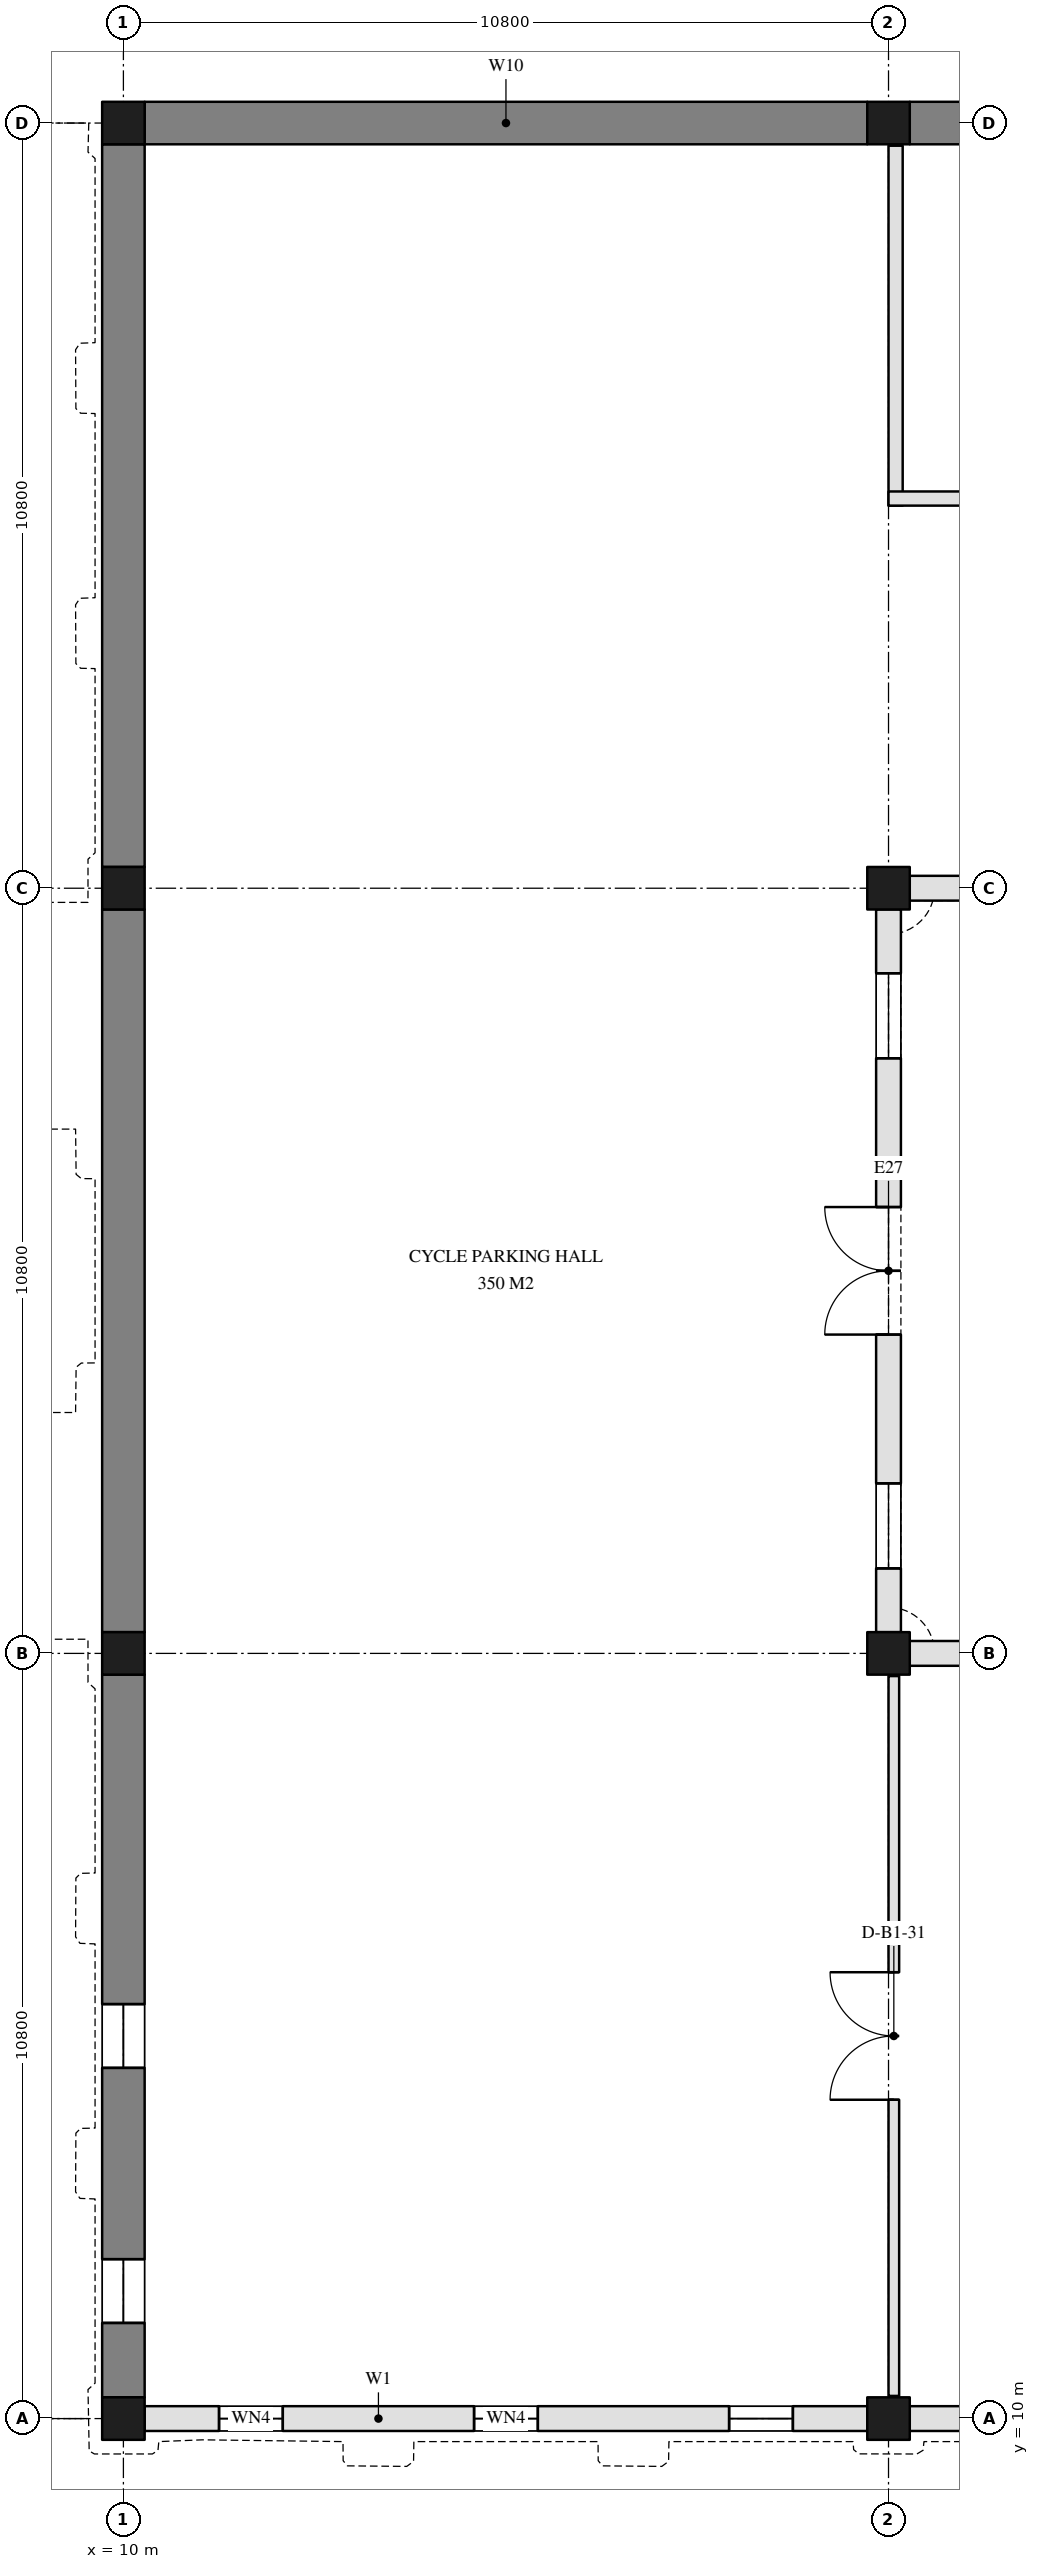
"""IFC4 building model, lengths in metres.
Left out: names, types, materials, properties, quantities, classifications, styles, units other than length and angle.
Written with IfcOpenShell. Run it as: python <this file> out.ifc"""

import sys

from ifc_helpers import new_model, si_unit, direction, frame, frame_2d, origin, origin_2d, place, context, subcontext, project, spatial, rectangle, extrude, element, fill, save


model = new_model("IFC4")
c1 = context("Model", 3, precision=1e-05, world=origin(), true_north=direction((0.0, 1.0)))
c2 = subcontext(c1, "Body", "Model", "MODEL_VIEW")
j1 = project(units=[si_unit("LENGTHUNIT", "METRE"), si_unit("PLANEANGLEUNIT", "RADIAN")], contexts=[c1])
p1 = place(None, origin())
s1 = spatial("IfcSite", under=j1, at=p1, CompositionType="ELEMENT")
p2 = place(p1, origin())
s2 = spatial("IfcBuilding", under=s1, at=p2, CompositionType="ELEMENT")
p3 = place(p2, frame((0.0, 0.0, -5.4)))
s3 = spatial("IfcBuildingStorey", under=s2, at=p3, CompositionType="ELEMENT", Elevation=-5.4)
for number, where, z_axis, x_axis in (
    (1, (10.0, 10.0, -0.4), (0.0, 0.0, 1.0), (1.0, 0.0, 0.0)),
    (2, (10.0, 20.8, -0.4), (0.0, 0.0, 1.0), (1.0, 0.0, 0.0)),
    (3, (10.0, 31.6, -0.4), (0.0, 0.0, 1.0), (1.0, 0.0, 0.0)),
    (4, (10.0, 42.4, -0.4), (0.0, 0.0, 1.0), (1.0, 0.0, 0.0)),
    (5, (20.8, 10.0, -0.4), (0.0, 0.0, 1.0), (1.0, 0.0, 0.0)),
    (6, (20.8, 20.8, -0.4), (0.0, 0.0, 1.0), (1.0, 0.0, 0.0)),
    (7, (20.8, 31.6, -0.4), (0.0, 0.0, 1.0), (1.0, 0.0, 0.0)),
    (8, (20.8, 42.4, -0.4), (0.0, 0.0, 1.0), (1.0, 0.0, 0.0)),
):
    element("IfcColumn", number, at=place(p3, frame(where, z_axis=z_axis, x_axis=x_axis)), inside=s3, PredefinedType="COLUMN", context=c2, shape_type="SweptSolid", body=[
        extrude(rectangle(XDim=0.6, YDim=0.6, at=origin_2d()), origin(), (0.0, 0.0, 1.0), 5.8),
    ])
p4 = place(p3, frame((10.3, 10.0, 0.0), z_axis=(0.0, 0.0, 1.0), x_axis=(1.0, 0.0, 0.0)))
e9 = element("IfcWall", 9, at=p4, inside=s3, PredefinedType="SOLIDWALL", context=c2, shape_type="SweptSolid", body=[
    extrude(rectangle(XDim=10.2, YDim=0.35, at=frame_2d((5.1, 0.0))), origin(), (0.0, 0.0, 1.0), 3.9),
])
p5 = place(p4, frame((1.05, 0.0, 1.5)))
e10 = element("IfcOpeningElement", 10, at=p5, cuts=e9, PredefinedType="OPENING", context=c2, shape_type="SweptSolid", body=[
    extrude(rectangle(XDim=0.9, YDim=1.2, at=frame_2d((0.45, 0.6))), frame((0.0, 0.185, 0.0), z_axis=(0.0, -1.0, 0.0), x_axis=(1.0, 0.0, 0.0)), (0.0, 0.0, 1.0), 0.37),
])
p6 = place(p4, frame((4.65, 0.0, 1.5)))
e11 = element("IfcOpeningElement", 11, at=p6, cuts=e9, PredefinedType="OPENING", context=c2, shape_type="SweptSolid", body=[
    extrude(rectangle(XDim=0.9, YDim=1.2, at=frame_2d((0.45, 0.6))), frame((0.0, 0.185, 0.0), z_axis=(0.0, -1.0, 0.0), x_axis=(1.0, 0.0, 0.0)), (0.0, 0.0, 1.0), 0.37),
])
p7 = place(p4, frame((8.25, 0.0, 1.5)))
e12 = element("IfcOpeningElement", 12, at=p7, cuts=e9, PredefinedType="OPENING", context=c2, shape_type="SweptSolid", body=[
    extrude(rectangle(XDim=0.9, YDim=1.2, at=frame_2d((0.45, 0.6))), frame((0.0, 0.185, 0.0), z_axis=(0.0, -1.0, 0.0), x_axis=(1.0, 0.0, 0.0)), (0.0, 0.0, 1.0), 0.37),
])
p8 = place(p3, frame((21.1, 10.0, 0.0), z_axis=(0.0, 0.0, 1.0), x_axis=(1.0, 0.0, 0.0)))
e13 = element("IfcWall", 13, at=p8, inside=s3, PredefinedType="SOLIDWALL", context=c2, shape_type="SweptSolid", body=[
    extrude(rectangle(XDim=10.2, YDim=0.35, at=frame_2d((5.1, 0.0))), origin(), (0.0, 0.0, 1.0), 3.9),
])
p9 = place(p8, frame((1.05, 0.0, 1.5)))
e14 = element("IfcOpeningElement", 14, at=p9, cuts=e13, PredefinedType="OPENING", context=c2, shape_type="SweptSolid", body=[
    extrude(rectangle(XDim=0.9, YDim=1.2, at=frame_2d((0.45, 0.6))), frame((0.0, 0.185, 0.0), z_axis=(0.0, -1.0, 0.0), x_axis=(1.0, 0.0, 0.0)), (0.0, 0.0, 1.0), 0.37),
])
p10 = place(p8, frame((3.75, 0.0, 0.0)))
e15 = element("IfcOpeningElement", 15, at=p10, cuts=e13, PredefinedType="OPENING", context=c2, shape_type="SweptSolid", body=[
    extrude(rectangle(XDim=2.7, YDim=2.4, at=frame_2d((1.35, 1.2))), frame((0.0, 0.185, 0.0), z_axis=(0.0, -1.0, 0.0), x_axis=(1.0, 0.0, 0.0)), (0.0, 0.0, 1.0), 0.37),
])
p11 = place(p8, frame((8.25, 0.0, 1.5)))
e16 = element("IfcOpeningElement", 16, at=p11, cuts=e13, PredefinedType="OPENING", context=c2, shape_type="SweptSolid", body=[
    extrude(rectangle(XDim=0.9, YDim=1.2, at=frame_2d((0.45, 0.6))), frame((0.0, 0.185, 0.0), z_axis=(0.0, -1.0, 0.0), x_axis=(1.0, 0.0, 0.0)), (0.0, 0.0, 1.0), 0.37),
])
p12 = place(p3, frame((10.0, 10.3, 0.0), z_axis=(0.0, 0.0, 1.0), x_axis=(0.0, 1.0, 0.0)))
e17 = element("IfcWall", 17, at=p12, inside=s3, PredefinedType="SOLIDWALL", context=c2, shape_type="SweptSolid", body=[
    extrude(rectangle(XDim=10.2, YDim=0.6, at=frame_2d((5.1, 0.0))), origin(), (0.0, 0.0, 1.0), 3.9),
])
p13 = place(p12, frame((1.05, 0.0, 1.5)))
e18 = element("IfcOpeningElement", 18, at=p13, cuts=e17, PredefinedType="OPENING", context=c2, shape_type="SweptSolid", body=[
    extrude(rectangle(XDim=0.9, YDim=1.2, at=frame_2d((0.45, 0.6))), frame((0.0, 0.31, 0.0), z_axis=(0.0, -1.0, 0.0), x_axis=(1.0, 0.0, 0.0)), (0.0, 0.0, 1.0), 0.62),
])
p14 = place(p12, frame((4.65, 0.0, 1.5)))
e19 = element("IfcOpeningElement", 19, at=p14, cuts=e17, PredefinedType="OPENING", context=c2, shape_type="SweptSolid", body=[
    extrude(rectangle(XDim=0.9, YDim=1.2, at=frame_2d((0.45, 0.6))), frame((0.0, 0.31, 0.0), z_axis=(0.0, -1.0, 0.0), x_axis=(1.0, 0.0, 0.0)), (0.0, 0.0, 1.0), 0.62),
])
p15 = place(p3, frame((10.0, 21.1, 0.0), z_axis=(0.0, 0.0, 1.0), x_axis=(0.0, 1.0, 0.0)))
e20 = element("IfcWall", 20, at=p15, inside=s3, PredefinedType="SOLIDWALL", context=c2, shape_type="SweptSolid", body=[
    extrude(rectangle(XDim=10.2, YDim=0.6, at=frame_2d((5.1, 0.0))), origin(), (0.0, 0.0, 1.0), 3.9),
])
p16 = place(p3, frame((10.0, 31.9, 0.0), z_axis=(0.0, 0.0, 1.0), x_axis=(0.0, 1.0, 0.0)))
e21 = element("IfcWall", 21, at=p16, inside=s3, PredefinedType="SOLIDWALL", context=c2, shape_type="SweptSolid", body=[
    extrude(rectangle(XDim=10.2, YDim=0.6, at=frame_2d((5.1, 0.0))), origin(), (0.0, 0.0, 1.0), 3.9),
])
for number, where, z_axis, x_axis in (
    (22, (10.3, 42.4, 0.0), (0.0, 0.0, 1.0), (1.0, 0.0, 0.0)),
    (23, (21.1, 42.4, 0.0), (0.0, 0.0, 1.0), (1.0, 0.0, 0.0)),
):
    element("IfcWall", number, at=place(p3, frame(where, z_axis=z_axis, x_axis=x_axis)), inside=s3, PredefinedType="SOLIDWALL", context=c2, shape_type="SweptSolid", body=[
        extrude(rectangle(XDim=10.2, YDim=0.6, at=frame_2d((5.1, 0.0))), origin(), (0.0, 0.0, 1.0), 3.9),
    ])
p17 = place(p3, frame((21.1, 20.8, 0.0), z_axis=(0.0, 0.0, 1.0), x_axis=(1.0, 0.0, 0.0)))
e24 = element("IfcWall", 24, at=p17, inside=s3, PredefinedType="SOLIDWALL", context=c2, shape_type="SweptSolid", body=[
    extrude(rectangle(XDim=10.2, YDim=0.35, at=frame_2d((5.1, 0.0))), origin(), (0.0, 0.0, 1.0), 3.6),
])
p18 = place(p17, frame((0.9, 0.0, 0.9)))
e25 = element("IfcOpeningElement", 25, at=p18, cuts=e24, PredefinedType="OPENING", context=c2, shape_type="SweptSolid", body=[
    extrude(rectangle(XDim=1.2, YDim=1.5, at=frame_2d((0.6, 0.75))), frame((0.0, 0.185, 0.0), z_axis=(0.0, -1.0, 0.0), x_axis=(1.0, 0.0, 0.0)), (0.0, 0.0, 1.0), 0.37),
])
p19 = place(p17, frame((4.2, 0.0, 0.0)))
e26 = element("IfcOpeningElement", 26, at=p19, cuts=e24, PredefinedType="OPENING", context=c2, shape_type="SweptSolid", body=[
    extrude(rectangle(XDim=1.8, YDim=2.4, at=frame_2d((0.9, 1.2))), frame((0.0, 0.185, 0.0), z_axis=(0.0, -1.0, 0.0), x_axis=(1.0, 0.0, 0.0)), (0.0, 0.0, 1.0), 0.37),
])
p20 = place(p17, frame((8.1, 0.0, 0.9)))
e27 = element("IfcOpeningElement", 27, at=p20, cuts=e24, PredefinedType="OPENING", context=c2, shape_type="SweptSolid", body=[
    extrude(rectangle(XDim=1.2, YDim=1.5, at=frame_2d((0.6, 0.75))), frame((0.0, 0.185, 0.0), z_axis=(0.0, -1.0, 0.0), x_axis=(1.0, 0.0, 0.0)), (0.0, 0.0, 1.0), 0.37),
])
p21 = place(p3, frame((21.1, 31.6, 0.0), z_axis=(0.0, 0.0, 1.0), x_axis=(1.0, 0.0, 0.0)))
e28 = element("IfcWall", 28, at=p21, inside=s3, PredefinedType="SOLIDWALL", context=c2, shape_type="SweptSolid", body=[
    extrude(rectangle(XDim=10.2, YDim=0.35, at=frame_2d((5.1, 0.0))), origin(), (0.0, 0.0, 1.0), 3.6),
])
p22 = place(p21, frame((0.9, 0.0, 0.9)))
e29 = element("IfcOpeningElement", 29, at=p22, cuts=e28, PredefinedType="OPENING", context=c2, shape_type="SweptSolid", body=[
    extrude(rectangle(XDim=1.2, YDim=1.5, at=frame_2d((0.6, 0.75))), frame((0.0, 0.185, 0.0), z_axis=(0.0, -1.0, 0.0), x_axis=(1.0, 0.0, 0.0)), (0.0, 0.0, 1.0), 0.37),
])
p23 = place(p21, frame((4.2, 0.0, 0.0)))
e30 = element("IfcOpeningElement", 30, at=p23, cuts=e28, PredefinedType="OPENING", context=c2, shape_type="SweptSolid", body=[
    extrude(rectangle(XDim=1.8, YDim=2.4, at=frame_2d((0.9, 1.2))), frame((0.0, 0.185, 0.0), z_axis=(0.0, -1.0, 0.0), x_axis=(1.0, 0.0, 0.0)), (0.0, 0.0, 1.0), 0.37),
])
p24 = place(p21, frame((8.1, 0.0, 0.9)))
e31 = element("IfcOpeningElement", 31, at=p24, cuts=e28, PredefinedType="OPENING", context=c2, shape_type="SweptSolid", body=[
    extrude(rectangle(XDim=1.2, YDim=1.5, at=frame_2d((0.6, 0.75))), frame((0.0, 0.185, 0.0), z_axis=(0.0, -1.0, 0.0), x_axis=(1.0, 0.0, 0.0)), (0.0, 0.0, 1.0), 0.37),
])
p25 = place(p3, frame((20.8, 21.1, 0.0), z_axis=(0.0, 0.0, 1.0), x_axis=(0.0, 1.0, 0.0)))
e32 = element("IfcWall", 32, at=p25, inside=s3, PredefinedType="SOLIDWALL", context=c2, shape_type="SweptSolid", body=[
    extrude(rectangle(XDim=10.2, YDim=0.35, at=frame_2d((5.1, 0.0))), origin(), (0.0, 0.0, 1.0), 3.6),
])
p26 = place(p25, frame((0.9, 0.0, 0.9)))
e33 = element("IfcOpeningElement", 33, at=p26, cuts=e32, PredefinedType="OPENING", context=c2, shape_type="SweptSolid", body=[
    extrude(rectangle(XDim=1.2, YDim=1.5, at=frame_2d((0.6, 0.75))), frame((0.0, 0.185, 0.0), z_axis=(0.0, -1.0, 0.0), x_axis=(1.0, 0.0, 0.0)), (0.0, 0.0, 1.0), 0.37),
])
p27 = place(p25, frame((4.2, 0.0, 0.0)))
e34 = element("IfcOpeningElement", 34, at=p27, cuts=e32, PredefinedType="OPENING", context=c2, shape_type="SweptSolid", body=[
    extrude(rectangle(XDim=1.8, YDim=2.4, at=frame_2d((0.9, 1.2))), frame((0.0, 0.185, 0.0), z_axis=(0.0, -1.0, 0.0), x_axis=(1.0, 0.0, 0.0)), (0.0, 0.0, 1.0), 0.37),
])
p28 = place(p25, frame((8.1, 0.0, 0.9)))
e35 = element("IfcOpeningElement", 35, at=p28, cuts=e32, PredefinedType="OPENING", context=c2, shape_type="SweptSolid", body=[
    extrude(rectangle(XDim=1.2, YDim=1.5, at=frame_2d((0.6, 0.75))), frame((0.0, 0.185, 0.0), z_axis=(0.0, -1.0, 0.0), x_axis=(1.0, 0.0, 0.0)), (0.0, 0.0, 1.0), 0.37),
])
p29 = place(p3, frame((20.875, 10.32, 0.0), z_axis=(0.0, 0.0, 1.0), x_axis=(0.0, 1.0, 0.0)))
e36 = element("IfcWall", 36, at=p29, inside=s3, PredefinedType="PARTITIONING", context=c2, shape_type="SweptSolid", body=[
    extrude(rectangle(XDim=10.16, YDim=0.15, at=frame_2d((5.08, 0.0))), origin(), (0.0, 0.0, 1.0), 3.6),
])
p30 = place(p29, frame((4.18, 0.0, 0.0)))
e37 = element("IfcOpeningElement", 37, at=p30, cuts=e36, PredefinedType="OPENING", context=c2, shape_type="SweptSolid", body=[
    extrude(rectangle(XDim=1.8, YDim=2.1, at=frame_2d((0.9, 1.05))), frame((0.0, 0.085, 0.0), z_axis=(0.0, -1.0, 0.0), x_axis=(1.0, 0.0, 0.0)), (0.0, 0.0, 1.0), 0.17),
])
p31 = place(p3, frame((20.9, 37.0, 0.0), z_axis=(0.0, 0.0, 1.0), x_axis=(0.0, 1.0, 0.0)))
e38 = element("IfcWall", 38, at=p31, inside=s3, PredefinedType="PARTITIONING", context=c2, shape_type="SweptSolid", body=[
    extrude(rectangle(XDim=5.08, YDim=0.2, at=frame_2d((2.54, 0.0))), origin(), (0.0, 0.0, 1.0), 3.6),
])
p32 = place(p3, frame((20.8, 37.1, 0.0), z_axis=(0.0, 0.0, 1.0), x_axis=(1.0, 0.0, 0.0)))
e39 = element("IfcWall", 39, at=p32, inside=s3, PredefinedType="PARTITIONING", context=c2, shape_type="SweptSolid", body=[
    extrude(rectangle(XDim=10.8, YDim=0.2, at=frame_2d((5.4, 0.0))), origin(), (0.0, 0.0, 1.0), 3.6),
])
p33 = place(p32, frame((4.9, 0.0, 0.0)))
e40 = element("IfcOpeningElement", 40, at=p33, cuts=e39, PredefinedType="OPENING", context=c2, shape_type="SweptSolid", body=[
    extrude(rectangle(XDim=1.0, YDim=2.1, at=frame_2d((0.5, 1.05))), frame((0.0, 0.11, 0.0), z_axis=(0.0, -1.0, 0.0), x_axis=(1.0, 0.0, 0.0)), (0.0, 0.0, 1.0), 0.22),
])
p34 = place(p5, origin())
e41 = element("IfcWindow", 41, at=p34, inside=s3, PartitioningType="SINGLE_PANEL", PredefinedType="WINDOW", context=c2, shape_type="SweptSolid", body=[
    extrude(rectangle(XDim=0.9, YDim=1.2, at=frame_2d((0.45, 0.6))), frame((0.0, 0.03, 0.0), z_axis=(0.0, -1.0, 0.0), x_axis=(1.0, 0.0, 0.0)), (0.0, 0.0, 1.0), 0.06),
])
fill(e10, e41)
p35 = place(p6, origin())
e42 = element("IfcWindow", 42, at=p35, inside=s3, PartitioningType="SINGLE_PANEL", PredefinedType="WINDOW", context=c2, shape_type="SweptSolid", body=[
    extrude(rectangle(XDim=0.9, YDim=1.2, at=frame_2d((0.45, 0.6))), frame((0.0, 0.03, 0.0), z_axis=(0.0, -1.0, 0.0), x_axis=(1.0, 0.0, 0.0)), (0.0, 0.0, 1.0), 0.06),
])
fill(e11, e42)
p36 = place(p7, origin())
e43 = element("IfcWindow", 43, at=p36, inside=s3, PartitioningType="SINGLE_PANEL", PredefinedType="WINDOW", context=c2, shape_type="SweptSolid", body=[
    extrude(rectangle(XDim=0.9, YDim=1.2, at=frame_2d((0.45, 0.6))), frame((0.0, 0.03, 0.0), z_axis=(0.0, -1.0, 0.0), x_axis=(1.0, 0.0, 0.0)), (0.0, 0.0, 1.0), 0.06),
])
fill(e12, e43)
p37 = place(p13, origin())
e44 = element("IfcWindow", 44, at=p37, inside=s3, PartitioningType="SINGLE_PANEL", PredefinedType="WINDOW", context=c2, shape_type="SweptSolid", body=[
    extrude(rectangle(XDim=0.9, YDim=1.2, at=frame_2d((0.45, 0.6))), frame((0.0, 0.03, 0.0), z_axis=(0.0, -1.0, 0.0), x_axis=(1.0, 0.0, 0.0)), (0.0, 0.0, 1.0), 0.06),
])
fill(e18, e44)
p38 = place(p14, origin())
e45 = element("IfcWindow", 45, at=p38, inside=s3, PartitioningType="SINGLE_PANEL", PredefinedType="WINDOW", context=c2, shape_type="SweptSolid", body=[
    extrude(rectangle(XDim=0.9, YDim=1.2, at=frame_2d((0.45, 0.6))), frame((0.0, 0.03, 0.0), z_axis=(0.0, -1.0, 0.0), x_axis=(1.0, 0.0, 0.0)), (0.0, 0.0, 1.0), 0.06),
])
fill(e19, e45)
p39 = place(p26, origin())
e46 = element("IfcWindow", 46, at=p39, inside=s3, PartitioningType="SINGLE_PANEL", PredefinedType="WINDOW", context=c2, shape_type="SweptSolid", body=[
    extrude(rectangle(XDim=1.2, YDim=1.5, at=frame_2d((0.6, 0.75))), frame((0.0, 0.03, 0.0), z_axis=(0.0, -1.0, 0.0), x_axis=(1.0, 0.0, 0.0)), (0.0, 0.0, 1.0), 0.06),
])
fill(e33, e46)
p40 = place(p27, origin())
e47 = element("IfcDoor", 47, at=p40, inside=s3, OperationType="DOUBLE_DOOR_DOUBLE_SWING", PredefinedType="DOOR", context=c2, shape_type="SweptSolid", body=[
    extrude(rectangle(XDim=1.8, YDim=2.4, at=frame_2d((0.9, 1.2))), frame((0.0, 0.025, 0.0), z_axis=(0.0, -1.0, 0.0), x_axis=(1.0, 0.0, 0.0)), (0.0, 0.0, 1.0), 0.05),
])
fill(e34, e47)
p41 = place(p28, origin())
e48 = element("IfcWindow", 48, at=p41, inside=s3, PartitioningType="SINGLE_PANEL", PredefinedType="WINDOW", context=c2, shape_type="SweptSolid", body=[
    extrude(rectangle(XDim=1.2, YDim=1.5, at=frame_2d((0.6, 0.75))), frame((0.0, 0.03, 0.0), z_axis=(0.0, -1.0, 0.0), x_axis=(1.0, 0.0, 0.0)), (0.0, 0.0, 1.0), 0.06),
])
fill(e35, e48)
p42 = place(p30, frame((1.8, 0.0, 0.0), z_axis=(0.0, 0.0, 1.0), x_axis=(-1.0, 0.0, 0.0)))
e49 = element("IfcDoor", 49, at=p42, inside=s3, OperationType="DOUBLE_DOOR_DOUBLE_SWING", PredefinedType="DOOR", context=c2, shape_type="SweptSolid", body=[
    extrude(rectangle(XDim=1.8, YDim=2.1, at=frame_2d((0.9, 1.05))), frame((0.0, 0.025, 0.0), z_axis=(0.0, -1.0, 0.0), x_axis=(1.0, 0.0, 0.0)), (0.0, 0.0, 1.0), 0.05),
])
fill(e37, e49)
save(model, sys.argv[1])
